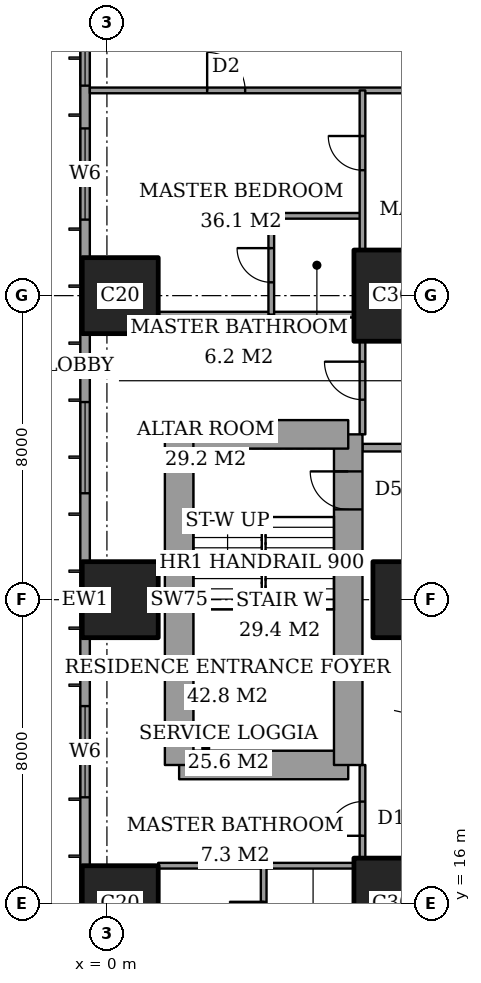
"""IFC4 building model, lengths in metres.
Left out: names, types, materials, properties, quantities, classifications, styles, units other than length and angle.
Written with IfcOpenShell. Run it as: python <this file> out.ifc"""

import sys

from ifc_helpers import new_model, si_unit, direction, frame, frame_2d, origin, origin_2d, place, context, subcontext, project, spatial, rectangle, extrude, element, fill, save


model = new_model("IFC4")
c1 = context("Model", 3, precision=1e-05, world=origin(), true_north=direction((0.0, 1.0)))
c2 = subcontext(c1, "Body", "Model", "MODEL_VIEW")
j1 = project(units=[si_unit("LENGTHUNIT", "METRE"), si_unit("PLANEANGLEUNIT", "RADIAN")], contexts=[c1])
p1 = place(None, origin())
s1 = spatial("IfcSite", under=j1, at=p1, CompositionType="ELEMENT")
p2 = place(p1, origin())
s2 = spatial("IfcBuilding", under=s1, at=p2, CompositionType="ELEMENT")
p3 = place(p2, frame((0.0, 0.0, 76.4)))
s3 = spatial("IfcBuildingStorey", under=s2, at=p3, CompositionType="ELEMENT", Elevation=76.4)
for number, where, z_axis, x_axis in (
    (1, (0.35, 16.0, 0.0), (0.0, 0.0, 1.0), (1.0, 0.0, 0.0)),
    (2, (0.35, 24.0, 0.0), (0.0, 0.0, 1.0), (1.0, 0.0, 0.0)),
    (3, (0.35, 32.0, 0.0), (0.0, 0.0, 1.0), (1.0, 0.0, 0.0)),
):
    element("IfcColumn", number, at=place(p3, frame(where, z_axis=z_axis, x_axis=x_axis)), inside=s3, PredefinedType="COLUMN", context=c2, shape_type="SweptSolid", body=[
        extrude(rectangle(XDim=2.0, YDim=2.0, at=origin_2d()), origin(), (0.0, 0.0, 1.0), 3.6),
    ])
p4 = place(p3, frame((8.0, 16.0, 0.0), z_axis=(0.0, 0.0, 1.0), x_axis=(1.0, 0.0, 0.0)))
e4 = element("IfcColumn", 4, at=p4, inside=s3, PredefinedType="COLUMN", context=c2, shape_type="SweptSolid", body=[
    extrude(rectangle(XDim=3.0, YDim=2.4, at=origin_2d()), origin(), (0.0, 0.0, 1.0), 3.6),
])
p5 = place(p3, frame((8.0, 24.0, 0.0), z_axis=(0.0, 0.0, 1.0), x_axis=(1.0, 0.0, 0.0)))
e5 = element("IfcColumn", 5, at=p5, inside=s3, PredefinedType="COLUMN", context=c2, shape_type="SweptSolid", body=[
    extrude(rectangle(XDim=2.0, YDim=2.0, at=origin_2d()), origin(), (0.0, 0.0, 1.0), 3.6),
])
p6 = place(p3, frame((8.0, 32.0, 0.0), z_axis=(0.0, 0.0, 1.0), x_axis=(1.0, 0.0, 0.0)))
e6 = element("IfcColumn", 6, at=p6, inside=s3, PredefinedType="COLUMN", context=c2, shape_type="SweptSolid", body=[
    extrude(rectangle(XDim=3.0, YDim=2.4, at=origin_2d()), origin(), (0.0, 0.0, 1.0), 3.6),
])
p7 = place(p3, frame((1.9, 19.65, 0.0), z_axis=(0.0, 0.0, 1.0), x_axis=(1.0, 0.0, 0.0)))
e7 = element("IfcWall", 7, at=p7, inside=s3, PredefinedType="SHEAR", context=c2, shape_type="SweptSolid", body=[
    extrude(rectangle(XDim=4.45, YDim=0.75, at=frame_2d((2.225, 0.0))), origin(), (0.0, 0.0, 1.0), 3.6),
])
p8 = place(p3, frame((6.35, 19.65, 0.0), z_axis=(0.0, 0.0, 1.0), x_axis=(0.0, 1.0, 0.0)))
e8 = element("IfcWall", 8, at=p8, inside=s3, PredefinedType="SHEAR", context=c2, shape_type="SweptSolid", body=[
    extrude(rectangle(XDim=8.7, YDim=0.75, at=frame_2d((4.35, 0.0))), origin(), (0.0, 0.0, 1.0), 3.6),
])
p9 = place(p8, frame((6.725, 0.0, 0.0)))
e9 = element("IfcOpeningElement", 9, at=p9, cuts=e8, PredefinedType="OPENING", context=c2, shape_type="SweptSolid", body=[
    extrude(rectangle(XDim=1.0, YDim=2.1, at=frame_2d((0.5, 1.05))), frame((0.0, 0.385, 0.0), z_axis=(0.0, -1.0, 0.0), x_axis=(1.0, 0.0, 0.0)), (0.0, 0.0, 1.0), 0.77),
])
p10 = place(p3, frame((6.35, 28.35, 0.0), z_axis=(0.0, 0.0, 1.0), x_axis=(-1.0, 0.0, 0.0)))
e10 = element("IfcWall", 10, at=p10, inside=s3, PredefinedType="SHEAR", context=c2, shape_type="SweptSolid", body=[
    extrude(rectangle(XDim=4.45, YDim=0.75, at=frame_2d((2.225, 0.0))), origin(), (0.0, 0.0, 1.0), 3.6),
])
p11 = place(p3, frame((1.9, 28.35, 0.0), z_axis=(0.0, 0.0, 1.0), x_axis=(0.0, -1.0, 0.0)))
e11 = element("IfcWall", 11, at=p11, inside=s3, PredefinedType="SHEAR", context=c2, shape_type="SweptSolid", body=[
    extrude(rectangle(XDim=8.7, YDim=0.75, at=frame_2d((4.35, 0.0))), origin(), (0.0, 0.0, 1.0), 3.6),
])
p12 = place(p3, frame((-0.575, 44.825, 0.0), z_axis=(0.0, 0.0, 1.0), x_axis=(0.0, -1.0, 0.0)))
e12 = element("IfcWall", 12, at=p12, inside=s3, PredefinedType="SOLIDWALL", context=c2, shape_type="SweptSolid", body=[
    extrude(rectangle(XDim=41.65, YDim=0.25, at=frame_2d((20.825, 0.0))), origin(), (0.0, 0.0, 1.0), 3.6),
])
p13 = place(p12, frame((0.775, 0.0, 0.6)))
e13 = element("IfcOpeningElement", 13, at=p13, cuts=e12, PredefinedType="OPENING", context=c2, shape_type="SweptSolid", body=[
    extrude(rectangle(XDim=2.4, YDim=2.0, at=frame_2d((1.2, 1.0))), frame((0.0, 0.135, 0.0), z_axis=(0.0, -1.0, 0.0), x_axis=(1.0, 0.0, 0.0)), (0.0, 0.0, 1.0), 0.27),
])
p14 = place(p12, frame((6.1, 0.0, 0.6)))
e14 = element("IfcOpeningElement", 14, at=p14, cuts=e12, PredefinedType="OPENING", context=c2, shape_type="SweptSolid", body=[
    extrude(rectangle(XDim=1.2, YDim=2.0, at=frame_2d((0.6, 1.0))), frame((0.0, 0.135, 0.0), z_axis=(0.0, -1.0, 0.0), x_axis=(1.0, 0.0, 0.0)), (0.0, 0.0, 1.0), 0.27),
])
p15 = place(p12, frame((8.425, 0.0, 0.6)))
e15 = element("IfcOpeningElement", 15, at=p15, cuts=e12, PredefinedType="OPENING", context=c2, shape_type="SweptSolid", body=[
    extrude(rectangle(XDim=2.4, YDim=2.0, at=frame_2d((1.2, 1.0))), frame((0.0, 0.135, 0.0), z_axis=(0.0, -1.0, 0.0), x_axis=(1.0, 0.0, 0.0)), (0.0, 0.0, 1.0), 0.27),
])
p16 = place(p12, frame((15.625, 0.0, 0.6)))
e16 = element("IfcOpeningElement", 16, at=p16, cuts=e12, PredefinedType="OPENING", context=c2, shape_type="SweptSolid", body=[
    extrude(rectangle(XDim=2.4, YDim=2.0, at=frame_2d((1.2, 1.0))), frame((0.0, 0.135, 0.0), z_axis=(0.0, -1.0, 0.0), x_axis=(1.0, 0.0, 0.0)), (0.0, 0.0, 1.0), 0.27),
])
p17 = place(p12, frame((23.625, 0.0, 0.6)))
e17 = element("IfcOpeningElement", 17, at=p17, cuts=e12, PredefinedType="OPENING", context=c2, shape_type="SweptSolid", body=[
    extrude(rectangle(XDim=2.4, YDim=2.0, at=frame_2d((1.2, 1.0))), frame((0.0, 0.135, 0.0), z_axis=(0.0, -1.0, 0.0), x_axis=(1.0, 0.0, 0.0)), (0.0, 0.0, 1.0), 0.27),
])
p18 = place(p12, frame((30.625, 0.0, 0.6)))
e18 = element("IfcOpeningElement", 18, at=p18, cuts=e12, PredefinedType="OPENING", context=c2, shape_type="SweptSolid", body=[
    extrude(rectangle(XDim=2.4, YDim=2.0, at=frame_2d((1.2, 1.0))), frame((0.0, 0.135, 0.0), z_axis=(0.0, -1.0, 0.0), x_axis=(1.0, 0.0, 0.0)), (0.0, 0.0, 1.0), 0.27),
])
p19 = place(p12, frame((34.225, 0.0, 0.6)))
e19 = element("IfcOpeningElement", 19, at=p19, cuts=e12, PredefinedType="OPENING", context=c2, shape_type="SweptSolid", body=[
    extrude(rectangle(XDim=1.2, YDim=2.0, at=frame_2d((0.6, 1.0))), frame((0.0, 0.135, 0.0), z_axis=(0.0, -1.0, 0.0), x_axis=(1.0, 0.0, 0.0)), (0.0, 0.0, 1.0), 0.27),
])
p20 = place(p12, frame((38.475, 0.0, 0.6)))
e20 = element("IfcOpeningElement", 20, at=p20, cuts=e12, PredefinedType="OPENING", context=c2, shape_type="SweptSolid", body=[
    extrude(rectangle(XDim=2.4, YDim=2.0, at=frame_2d((1.2, 1.0))), frame((0.0, 0.135, 0.0), z_axis=(0.0, -1.0, 0.0), x_axis=(1.0, 0.0, 0.0)), (0.0, 0.0, 1.0), 0.27),
])
p21 = place(p3, frame((1.35, 17.0, 0.0), z_axis=(0.0, 0.0, 1.0), x_axis=(1.0, 0.0, 0.0)))
e21 = element("IfcWall", 21, at=p21, inside=s3, PredefinedType="PARTITIONING", context=c2, shape_type="SweptSolid", body=[
    extrude(rectangle(XDim=5.15, YDim=0.15, at=frame_2d((2.575, 0.0))), origin(), (0.0, 0.0, 1.0), 3.35),
])
p22 = place(p3, frame((6.725, 28.0, 0.0), z_axis=(0.0, 0.0, 1.0), x_axis=(1.0, 0.0, 0.0)))
e22 = element("IfcWall", 22, at=p22, inside=s3, PredefinedType="PARTITIONING", context=c2, shape_type="SweptSolid", body=[
    extrude(rectangle(XDim=17.275, YDim=0.2, at=frame_2d((8.637, 0.0))), origin(), (0.0, 0.0, 1.0), 3.35),
])
p23 = place(p22, frame((6.475, 0.0, 0.0)))
e23 = element("IfcOpeningElement", 23, at=p23, cuts=e22, PredefinedType="OPENING", context=c2, shape_type="SweptSolid", body=[
    extrude(rectangle(XDim=1.2, YDim=2.4, at=frame_2d((0.6, 1.2))), frame((0.0, 0.11, 0.0), z_axis=(0.0, -1.0, 0.0), x_axis=(1.0, 0.0, 0.0)), (0.0, 0.0, 1.0), 0.22),
])
p24 = place(p3, frame((1.35, 31.5, 0.0), z_axis=(0.0, 0.0, 1.0), x_axis=(1.0, 0.0, 0.0)))
e24 = element("IfcWall", 24, at=p24, inside=s3, PredefinedType="PARTITIONING", context=c2, shape_type="SweptSolid", body=[
    extrude(rectangle(XDim=5.15, YDim=0.15, at=frame_2d((2.575, 0.0))), origin(), (0.0, 0.0, 1.0), 3.35),
])
p25 = place(p3, frame((4.325, 34.1, 0.0), z_axis=(0.0, 0.0, 1.0), x_axis=(1.0, 0.0, 0.0)))
e25 = element("IfcWall", 25, at=p25, inside=s3, PredefinedType="PARTITIONING", context=c2, shape_type="SweptSolid", body=[
    extrude(rectangle(XDim=2.4, YDim=0.15, at=frame_2d((1.2, 0.0))), origin(), (0.0, 0.0, 1.0), 3.35),
])
p26 = place(p3, frame((-0.45, 37.4, 0.0), z_axis=(0.0, 0.0, 1.0), x_axis=(1.0, 0.0, 0.0)))
e26 = element("IfcWall", 26, at=p26, inside=s3, PredefinedType="PARTITIONING", context=c2, shape_type="SweptSolid", body=[
    extrude(rectangle(XDim=25.011, YDim=0.15, at=frame_2d((12.505, 0.0))), origin(), (0.0, 0.0, 1.0), 3.35),
])
p27 = place(p26, frame((10.65, 0.0, 0.0)))
e27 = element("IfcOpeningElement", 27, at=p27, cuts=e26, PredefinedType="OPENING", context=c2, shape_type="SweptSolid", body=[
    extrude(rectangle(XDim=1.0, YDim=2.1, at=frame_2d((0.5, 1.05))), frame((0.0, 0.085, 0.0), z_axis=(0.0, -1.0, 0.0), x_axis=(1.0, 0.0, 0.0)), (0.0, 0.0, 1.0), 0.17),
])
p28 = place(p26, frame((3.087, 0.0, 0.0)))
e28 = element("IfcOpeningElement", 28, at=p28, cuts=e26, PredefinedType="OPENING", context=c2, shape_type="SweptSolid", body=[
    extrude(rectangle(XDim=1.0, YDim=2.1, at=frame_2d((0.5, 1.05))), frame((0.0, 0.085, 0.0), z_axis=(0.0, -1.0, 0.0), x_axis=(1.0, 0.0, 0.0)), (0.0, 0.0, 1.0), 0.17),
])
p29 = place(p26, frame((13.45, 0.0, 0.0)))
e29 = element("IfcOpeningElement", 29, at=p29, cuts=e26, PredefinedType="OPENING", context=c2, shape_type="SweptSolid", body=[
    extrude(rectangle(XDim=1.0, YDim=2.1, at=frame_2d((0.5, 1.05))), frame((0.0, 0.085, 0.0), z_axis=(0.0, -1.0, 0.0), x_axis=(1.0, 0.0, 0.0)), (0.0, 0.0, 1.0), 0.17),
])
p30 = place(p26, frame((16.55, 0.0, 0.0)))
e30 = element("IfcOpeningElement", 30, at=p30, cuts=e26, PredefinedType="OPENING", context=c2, shape_type="SweptSolid", body=[
    extrude(rectangle(XDim=1.0, YDim=2.1, at=frame_2d((0.5, 1.05))), frame((0.0, 0.085, 0.0), z_axis=(0.0, -1.0, 0.0), x_axis=(1.0, 0.0, 0.0)), (0.0, 0.0, 1.0), 0.17),
])
p31 = place(p26, frame((21.175, 0.0, 0.0)))
e31 = element("IfcOpeningElement", 31, at=p31, cuts=e26, PredefinedType="OPENING", context=c2, shape_type="SweptSolid", body=[
    extrude(rectangle(XDim=1.0, YDim=2.1, at=frame_2d((0.5, 1.05))), frame((0.0, 0.085, 0.0), z_axis=(0.0, -1.0, 0.0), x_axis=(1.0, 0.0, 0.0)), (0.0, 0.0, 1.0), 0.17),
])
p32 = place(p3, frame((4.125, 14.2, 0.0), z_axis=(0.0, 0.0, 1.0), x_axis=(0.0, 1.0, 0.0)))
e32 = element("IfcWall", 32, at=p32, inside=s3, PredefinedType="PARTITIONING", context=c2, shape_type="SweptSolid", body=[
    extrude(rectangle(XDim=2.8, YDim=0.15, at=frame_2d((1.4, 0.0))), origin(), (0.0, 0.0, 1.0), 3.35),
])
p33 = place(p32, frame((0.95, 0.0, 0.0)))
e33 = element("IfcOpeningElement", 33, at=p33, cuts=e32, PredefinedType="OPENING", context=c2, shape_type="SweptSolid", body=[
    extrude(rectangle(XDim=0.9, YDim=2.1, at=frame_2d((0.45, 1.05))), frame((0.0, 0.085, 0.0), z_axis=(0.0, -1.0, 0.0), x_axis=(1.0, 0.0, 0.0)), (0.0, 0.0, 1.0), 0.17),
])
p34 = place(p3, frame((4.325, 31.5, 0.0), z_axis=(0.0, 0.0, 1.0), x_axis=(0.0, 1.0, 0.0)))
e34 = element("IfcWall", 34, at=p34, inside=s3, PredefinedType="PARTITIONING", context=c2, shape_type="SweptSolid", body=[
    extrude(rectangle(XDim=2.6, YDim=0.15, at=frame_2d((1.3, 0.0))), origin(), (0.0, 0.0, 1.0), 3.35),
])
p35 = place(p34, frame((0.85, 0.0, 0.0)))
e35 = element("IfcOpeningElement", 35, at=p35, cuts=e34, PredefinedType="OPENING", context=c2, shape_type="SweptSolid", body=[
    extrude(rectangle(XDim=0.9, YDim=2.1, at=frame_2d((0.45, 1.05))), frame((0.0, 0.085, 0.0), z_axis=(0.0, -1.0, 0.0), x_axis=(1.0, 0.0, 0.0)), (0.0, 0.0, 1.0), 0.17),
])
p36 = place(p3, frame((6.725, 17.2, 0.0), z_axis=(0.0, 0.0, 1.0), x_axis=(0.0, 1.0, 0.0)))
e36 = element("IfcWall", 36, at=p36, inside=s3, PredefinedType="PARTITIONING", context=c2, shape_type="SweptSolid", body=[
    extrude(rectangle(XDim=2.45, YDim=0.15, at=frame_2d((1.225, 0.0))), origin(), (0.0, 0.0, 1.0), 3.35),
])
p37 = place(p36, frame((0.587, 0.0, 0.0)))
e37 = element("IfcOpeningElement", 37, at=p37, cuts=e36, PredefinedType="OPENING", context=c2, shape_type="SweptSolid", body=[
    extrude(rectangle(XDim=0.9, YDim=2.1, at=frame_2d((0.45, 1.05))), frame((0.0, 0.085, 0.0), z_axis=(0.0, -1.0, 0.0), x_axis=(1.0, 0.0, 0.0)), (0.0, 0.0, 1.0), 0.17),
])
p38 = place(p3, frame((6.725, 28.35, 0.0), z_axis=(0.0, 0.0, 1.0), x_axis=(0.0, 1.0, 0.0)))
e38 = element("IfcWall", 38, at=p38, inside=s3, PredefinedType="PARTITIONING", context=c2, shape_type="SweptSolid", body=[
    extrude(rectangle(XDim=2.45, YDim=0.15, at=frame_2d((1.225, 0.0))), origin(), (0.0, 0.0, 1.0), 3.35),
])
p39 = place(p38, frame((0.913, 0.0, 0.0)))
e39 = element("IfcOpeningElement", 39, at=p39, cuts=e38, PredefinedType="OPENING", context=c2, shape_type="SweptSolid", body=[
    extrude(rectangle(XDim=1.0, YDim=2.1, at=frame_2d((0.5, 1.05))), frame((0.0, 0.085, 0.0), z_axis=(0.0, -1.0, 0.0), x_axis=(1.0, 0.0, 0.0)), (0.0, 0.0, 1.0), 0.17),
])
p40 = place(p3, frame((6.725, 33.2, 0.0), z_axis=(0.0, 0.0, 1.0), x_axis=(0.0, 1.0, 0.0)))
e40 = element("IfcWall", 40, at=p40, inside=s3, PredefinedType="PARTITIONING", context=c2, shape_type="SweptSolid", body=[
    extrude(rectangle(XDim=4.2, YDim=0.15, at=frame_2d((2.1, 0.0))), origin(), (0.0, 0.0, 1.0), 3.35),
])
p41 = place(p40, frame((2.1, 0.0, 0.0)))
e41 = element("IfcOpeningElement", 41, at=p41, cuts=e40, PredefinedType="OPENING", context=c2, shape_type="SweptSolid", body=[
    extrude(rectangle(XDim=0.9, YDim=2.1, at=frame_2d((0.45, 1.05))), frame((0.0, 0.085, 0.0), z_axis=(0.0, -1.0, 0.0), x_axis=(1.0, 0.0, 0.0)), (0.0, 0.0, 1.0), 0.17),
])
p42 = place(p14, origin())
e42 = element("IfcWindow", 42, at=p42, inside=s3, PartitioningType="SINGLE_PANEL", PredefinedType="WINDOW", context=c2, shape_type="SweptSolid", body=[
    extrude(rectangle(XDim=1.2, YDim=2.0, at=frame_2d((0.6, 1.0))), frame((0.0, 0.03, 0.0), z_axis=(0.0, -1.0, 0.0), x_axis=(1.0, 0.0, 0.0)), (0.0, 0.0, 1.0), 0.06),
])
fill(e14, e42)
p43 = place(p15, origin())
e43 = element("IfcWindow", 43, at=p43, inside=s3, PartitioningType="SINGLE_PANEL", PredefinedType="WINDOW", context=c2, shape_type="SweptSolid", body=[
    extrude(rectangle(XDim=2.4, YDim=2.0, at=frame_2d((1.2, 1.0))), frame((0.0, 0.03, 0.0), z_axis=(0.0, -1.0, 0.0), x_axis=(1.0, 0.0, 0.0)), (0.0, 0.0, 1.0), 0.06),
])
fill(e15, e43)
p44 = place(p16, origin())
e44 = element("IfcWindow", 44, at=p44, inside=s3, PartitioningType="SINGLE_PANEL", PredefinedType="WINDOW", context=c2, shape_type="SweptSolid", body=[
    extrude(rectangle(XDim=2.4, YDim=2.0, at=frame_2d((1.2, 1.0))), frame((0.0, 0.03, 0.0), z_axis=(0.0, -1.0, 0.0), x_axis=(1.0, 0.0, 0.0)), (0.0, 0.0, 1.0), 0.06),
])
fill(e16, e44)
p45 = place(p17, origin())
e45 = element("IfcWindow", 45, at=p45, inside=s3, PartitioningType="SINGLE_PANEL", PredefinedType="WINDOW", context=c2, shape_type="SweptSolid", body=[
    extrude(rectangle(XDim=2.4, YDim=2.0, at=frame_2d((1.2, 1.0))), frame((0.0, 0.03, 0.0), z_axis=(0.0, -1.0, 0.0), x_axis=(1.0, 0.0, 0.0)), (0.0, 0.0, 1.0), 0.06),
])
fill(e17, e45)
p46 = place(p33, origin())
e46 = element("IfcDoor", 46, at=p46, inside=s3, OperationType="SINGLE_SWING_LEFT", PredefinedType="DOOR", context=c2, shape_type="SweptSolid", body=[
    extrude(rectangle(XDim=0.9, YDim=2.1, at=frame_2d((0.45, 1.05))), frame((0.0, 0.025, 0.0), z_axis=(0.0, -1.0, 0.0), x_axis=(1.0, 0.0, 0.0)), (0.0, 0.0, 1.0), 0.05),
])
fill(e33, e46)
p47 = place(p37, origin())
e47 = element("IfcDoor", 47, at=p47, inside=s3, OperationType="SINGLE_SWING_RIGHT", PredefinedType="DOOR", context=c2, shape_type="SweptSolid", body=[
    extrude(rectangle(XDim=0.9, YDim=2.1, at=frame_2d((0.45, 1.05))), frame((0.0, 0.025, 0.0), z_axis=(0.0, -1.0, 0.0), x_axis=(1.0, 0.0, 0.0)), (0.0, 0.0, 1.0), 0.05),
])
fill(e37, e47)
p48 = place(p35, origin())
e48 = element("IfcDoor", 48, at=p48, inside=s3, OperationType="SINGLE_SWING_LEFT", PredefinedType="DOOR", context=c2, shape_type="SweptSolid", body=[
    extrude(rectangle(XDim=0.9, YDim=2.1, at=frame_2d((0.45, 1.05))), frame((0.0, 0.025, 0.0), z_axis=(0.0, -1.0, 0.0), x_axis=(1.0, 0.0, 0.0)), (0.0, 0.0, 1.0), 0.05),
])
fill(e35, e48)
p49 = place(p28, origin())
e49 = element("IfcDoor", 49, at=p49, inside=s3, OperationType="SINGLE_SWING_RIGHT", PredefinedType="DOOR", context=c2, shape_type="SweptSolid", body=[
    extrude(rectangle(XDim=1.0, YDim=2.1, at=frame_2d((0.5, 1.05))), frame((0.0, 0.025, 0.0), z_axis=(0.0, -1.0, 0.0), x_axis=(1.0, 0.0, 0.0)), (0.0, 0.0, 1.0), 0.05),
])
fill(e28, e49)
p50 = place(p39, origin())
e50 = element("IfcDoor", 50, at=p50, inside=s3, OperationType="SINGLE_SWING_LEFT", PredefinedType="DOOR", context=c2, shape_type="SweptSolid", body=[
    extrude(rectangle(XDim=1.0, YDim=2.1, at=frame_2d((0.5, 1.05))), frame((0.0, 0.025, 0.0), z_axis=(0.0, -1.0, 0.0), x_axis=(1.0, 0.0, 0.0)), (0.0, 0.0, 1.0), 0.05),
])
fill(e39, e50)
p51 = place(p41, origin())
e51 = element("IfcDoor", 51, at=p51, inside=s3, OperationType="SINGLE_SWING_LEFT", PredefinedType="DOOR", context=c2, shape_type="SweptSolid", body=[
    extrude(rectangle(XDim=0.9, YDim=2.1, at=frame_2d((0.45, 1.05))), frame((0.0, 0.025, 0.0), z_axis=(0.0, -1.0, 0.0), x_axis=(1.0, 0.0, 0.0)), (0.0, 0.0, 1.0), 0.05),
])
fill(e41, e51)
p52 = place(p9, origin())
e52 = element("IfcDoor", 52, at=p52, inside=s3, OperationType="SINGLE_SWING_LEFT", PredefinedType="DOOR", context=c2, shape_type="SweptSolid", body=[
    extrude(rectangle(XDim=1.0, YDim=2.1, at=frame_2d((0.5, 1.05))), frame((0.0, 0.025, 0.0), z_axis=(0.0, -1.0, 0.0), x_axis=(1.0, 0.0, 0.0)), (0.0, 0.0, 1.0), 0.05),
])
fill(e9, e52)
save(model, sys.argv[1])
